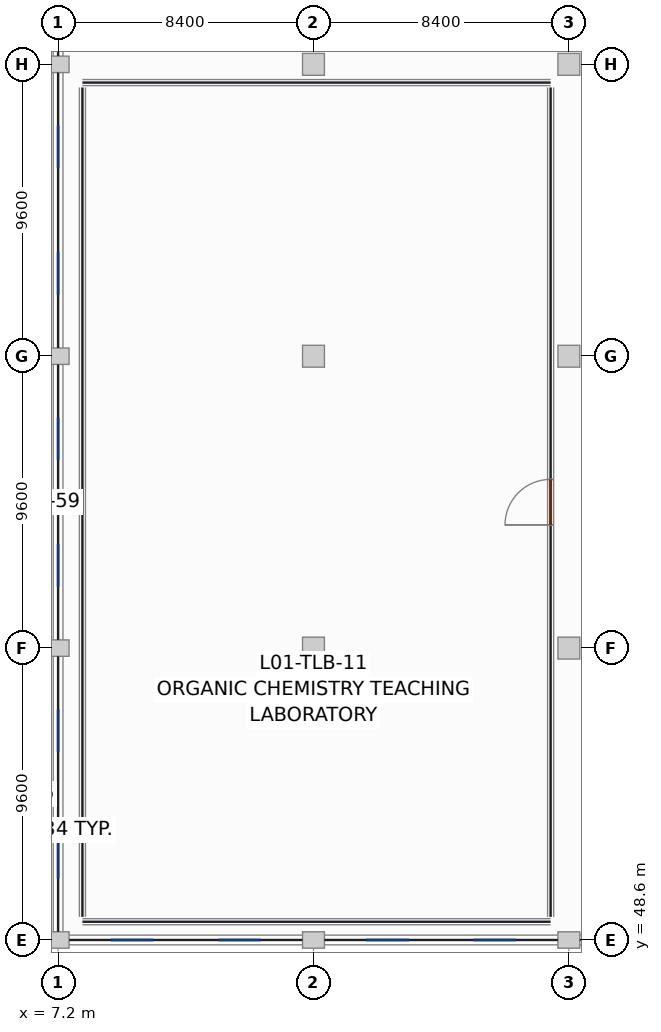
"""IFC4 building model, lengths in metres.
Left out: names, types, materials, properties, quantities, classifications, styles, units other than length and angle.
Written with IfcOpenShell. Run it as: python <this file> out.ifc"""

import sys

from ifc_helpers import new_model, si_unit, direction, frame, frame_2d, origin, origin_2d, place, context, subcontext, project, spatial, rectangle, extrude, element, fill, save


model = new_model("IFC4")
c1 = context("Model", 3, precision=1e-05, world=origin(), true_north=direction((0.0, 1.0)))
c2 = subcontext(c1, "Body", "Model", "MODEL_VIEW")
j1 = project(units=[si_unit("LENGTHUNIT", "METRE"), si_unit("PLANEANGLEUNIT", "RADIAN")], contexts=[c1])
p1 = place(None, origin())
s1 = spatial("IfcSite", under=j1, at=p1, CompositionType="ELEMENT")
p2 = place(p1, origin())
s2 = spatial("IfcBuilding", under=s1, at=p2, CompositionType="ELEMENT")
p3 = place(p2, frame((0.0, 0.0, 5.4)))
s3 = spatial("IfcBuildingStorey", under=s2, at=p3, CompositionType="ELEMENT", Elevation=5.4)
for number, where, z_axis, x_axis in (
    (1, (7.2, 48.6, 0.0), (0.0, 0.0, 1.0), (1.0, 0.0, 0.0)),
    (2, (7.2, 58.2, 0.0), (0.0, 0.0, 1.0), (1.0, 0.0, 0.0)),
    (3, (7.2, 67.8, 0.0), (0.0, 0.0, 1.0), (1.0, 0.0, 0.0)),
    (4, (7.2, 77.4, 0.0), (0.0, 0.0, 1.0), (1.0, 0.0, 0.0)),
):
    element("IfcColumn", number, at=place(p3, frame(where, z_axis=z_axis, x_axis=x_axis)), inside=s3, PredefinedType="COLUMN", context=c2, shape_type="SweptSolid", body=[
        extrude(rectangle(XDim=0.72, YDim=0.54, at=origin_2d()), origin(), (0.0, 0.0, 1.0), 4.28),
    ])
p4 = place(p3, frame((15.6, 48.6, 0.0), z_axis=(0.0, 0.0, 1.0), x_axis=(1.0, 0.0, 0.0)))
e5 = element("IfcColumn", 5, at=p4, inside=s3, PredefinedType="COLUMN", context=c2, shape_type="SweptSolid", body=[
    extrude(rectangle(XDim=0.72, YDim=0.54, at=origin_2d()), origin(), (0.0, 0.0, 1.0), 4.18),
])
for number, where, z_axis, x_axis in (
    (6, (15.6, 58.2, 0.0), (0.0, 0.0, 1.0), (1.0, 0.0, 0.0)),
    (7, (15.6, 67.8, 0.0), (0.0, 0.0, 1.0), (1.0, 0.0, 0.0)),
    (8, (15.6, 77.4, 0.0), (0.0, 0.0, 1.0), (1.0, 0.0, 0.0)),
):
    element("IfcColumn", number, at=place(p3, frame(where, z_axis=z_axis, x_axis=x_axis)), inside=s3, PredefinedType="COLUMN", context=c2, shape_type="SweptSolid", body=[
        extrude(rectangle(XDim=0.72, YDim=0.72, at=origin_2d()), origin(), (0.0, 0.0, 1.0), 4.18),
    ])
p5 = place(p3, frame((24.0, 48.6, 0.0), z_axis=(0.0, 0.0, 1.0), x_axis=(1.0, 0.0, 0.0)))
e9 = element("IfcColumn", 9, at=p5, inside=s3, PredefinedType="COLUMN", context=c2, shape_type="SweptSolid", body=[
    extrude(rectangle(XDim=0.72, YDim=0.54, at=origin_2d()), origin(), (0.0, 0.0, 1.0), 4.18),
])
for number, where, z_axis, x_axis in (
    (10, (24.0, 58.2, 0.0), (0.0, 0.0, 1.0), (1.0, 0.0, 0.0)),
    (11, (24.0, 67.8, 0.0), (0.0, 0.0, 1.0), (1.0, 0.0, 0.0)),
    (12, (24.0, 77.4, 0.0), (0.0, 0.0, 1.0), (1.0, 0.0, 0.0)),
):
    element("IfcColumn", number, at=place(p3, frame(where, z_axis=z_axis, x_axis=x_axis)), inside=s3, PredefinedType="COLUMN", context=c2, shape_type="SweptSolid", body=[
        extrude(rectangle(XDim=0.72, YDim=0.72, at=origin_2d()), origin(), (0.0, 0.0, 1.0), 4.18),
    ])
p6 = place(p3, frame((7.562, 48.6, 0.0), z_axis=(0.0, 0.0, 1.0), x_axis=(1.0, 0.0, 0.0)))
e13 = element("IfcWall", 13, at=p6, inside=s3, PredefinedType="SOLIDWALL", context=c2, shape_type="SweptSolid", body=[
    extrude(rectangle(XDim=7.676, YDim=0.32, at=frame_2d((3.838, 0.0))), origin(), (0.0, 0.0, 1.0), 3.38),
])
p7 = place(p6, frame((1.373, 0.0, 0.85)))
e14 = element("IfcOpeningElement", 14, at=p7, cuts=e13, PredefinedType="OPENING", context=c2, shape_type="SweptSolid", body=[
    extrude(rectangle(XDim=1.4, YDim=1.65, at=frame_2d((0.7, 0.825))), frame((0.0, 0.17, 0.0), z_axis=(0.0, -1.0, 0.0), x_axis=(1.0, 0.0, 0.0)), (0.0, 0.0, 1.0), 0.34),
])
p8 = place(p6, frame((4.904, 0.0, 0.85)))
e15 = element("IfcOpeningElement", 15, at=p8, cuts=e13, PredefinedType="OPENING", context=c2, shape_type="SweptSolid", body=[
    extrude(rectangle(XDim=1.4, YDim=1.65, at=frame_2d((0.7, 0.825))), frame((0.0, 0.17, 0.0), z_axis=(0.0, -1.0, 0.0), x_axis=(1.0, 0.0, 0.0)), (0.0, 0.0, 1.0), 0.34),
])
p9 = place(p3, frame((15.962, 48.6, 0.0), z_axis=(0.0, 0.0, 1.0), x_axis=(1.0, 0.0, 0.0)))
e16 = element("IfcWall", 16, at=p9, inside=s3, PredefinedType="SOLIDWALL", context=c2, shape_type="SweptSolid", body=[
    extrude(rectangle(XDim=7.676, YDim=0.32, at=frame_2d((3.838, 0.0))), origin(), (0.0, 0.0, 1.0), 3.38),
])
p10 = place(p9, frame((1.373, 0.0, 0.85)))
e17 = element("IfcOpeningElement", 17, at=p10, cuts=e16, PredefinedType="OPENING", context=c2, shape_type="SweptSolid", body=[
    extrude(rectangle(XDim=1.4, YDim=1.65, at=frame_2d((0.7, 0.825))), frame((0.0, 0.17, 0.0), z_axis=(0.0, -1.0, 0.0), x_axis=(1.0, 0.0, 0.0)), (0.0, 0.0, 1.0), 0.34),
])
p11 = place(p9, frame((4.904, 0.0, 0.85)))
e18 = element("IfcOpeningElement", 18, at=p11, cuts=e16, PredefinedType="OPENING", context=c2, shape_type="SweptSolid", body=[
    extrude(rectangle(XDim=1.4, YDim=1.65, at=frame_2d((0.7, 0.825))), frame((0.0, 0.17, 0.0), z_axis=(0.0, -1.0, 0.0), x_axis=(1.0, 0.0, 0.0)), (0.0, 0.0, 1.0), 0.34),
])
p12 = place(p3, frame((24.362, 48.6, 0.0), z_axis=(0.0, 0.0, 1.0), x_axis=(1.0, 0.0, 0.0)))
e19 = element("IfcWall", 19, at=p12, inside=s3, PredefinedType="SOLIDWALL", context=c2, shape_type="SweptSolid", body=[
    extrude(rectangle(XDim=7.676, YDim=0.32, at=frame_2d((3.838, 0.0))), origin(), (0.0, 0.0, 1.0), 3.38),
])
p13 = place(p12, frame((4.904, 0.0, 0.85)))
e20 = element("IfcOpeningElement", 20, at=p13, cuts=e19, PredefinedType="OPENING", context=c2, shape_type="SweptSolid", body=[
    extrude(rectangle(XDim=1.4, YDim=1.65, at=frame_2d((0.7, 0.825))), frame((0.0, 0.17, 0.0), z_axis=(0.0, -1.0, 0.0), x_axis=(1.0, 0.0, 0.0)), (0.0, 0.0, 1.0), 0.34),
])
p14 = place(p3, frame((7.2, 48.872, 0.0), z_axis=(0.0, 0.0, 1.0), x_axis=(0.0, 1.0, 0.0)))
e21 = element("IfcWall", 21, at=p14, inside=s3, PredefinedType="SOLIDWALL", context=c2, shape_type="SweptSolid", body=[
    extrude(rectangle(XDim=9.056, YDim=0.32, at=frame_2d((4.528, 0.0))), origin(), (0.0, 0.0, 1.0), 3.38),
])
p15 = place(p14, frame((1.745, 0.0, 0.85)))
e22 = element("IfcOpeningElement", 22, at=p15, cuts=e21, PredefinedType="OPENING", context=c2, shape_type="SweptSolid", body=[
    extrude(rectangle(XDim=1.4, YDim=1.65, at=frame_2d((0.7, 0.825))), frame((0.0, 0.17, 0.0), z_axis=(0.0, -1.0, 0.0), x_axis=(1.0, 0.0, 0.0)), (0.0, 0.0, 1.0), 0.34),
])
p16 = place(p14, frame((5.911, 0.0, 0.85)))
e23 = element("IfcOpeningElement", 23, at=p16, cuts=e21, PredefinedType="OPENING", context=c2, shape_type="SweptSolid", body=[
    extrude(rectangle(XDim=1.4, YDim=1.65, at=frame_2d((0.7, 0.825))), frame((0.0, 0.17, 0.0), z_axis=(0.0, -1.0, 0.0), x_axis=(1.0, 0.0, 0.0)), (0.0, 0.0, 1.0), 0.34),
])
p17 = place(p3, frame((7.2, 58.472, 0.0), z_axis=(0.0, 0.0, 1.0), x_axis=(0.0, 1.0, 0.0)))
e24 = element("IfcWall", 24, at=p17, inside=s3, PredefinedType="SOLIDWALL", context=c2, shape_type="SweptSolid", body=[
    extrude(rectangle(XDim=9.056, YDim=0.32, at=frame_2d((4.528, 0.0))), origin(), (0.0, 0.0, 1.0), 3.38),
])
p18 = place(p17, frame((1.745, 0.0, 0.85)))
e25 = element("IfcOpeningElement", 25, at=p18, cuts=e24, PredefinedType="OPENING", context=c2, shape_type="SweptSolid", body=[
    extrude(rectangle(XDim=1.4, YDim=1.65, at=frame_2d((0.7, 0.825))), frame((0.0, 0.17, 0.0), z_axis=(0.0, -1.0, 0.0), x_axis=(1.0, 0.0, 0.0)), (0.0, 0.0, 1.0), 0.34),
])
p19 = place(p17, frame((5.911, 0.0, 0.85)))
e26 = element("IfcOpeningElement", 26, at=p19, cuts=e24, PredefinedType="OPENING", context=c2, shape_type="SweptSolid", body=[
    extrude(rectangle(XDim=1.4, YDim=1.65, at=frame_2d((0.7, 0.825))), frame((0.0, 0.17, 0.0), z_axis=(0.0, -1.0, 0.0), x_axis=(1.0, 0.0, 0.0)), (0.0, 0.0, 1.0), 0.34),
])
p20 = place(p3, frame((7.2, 68.072, 0.0), z_axis=(0.0, 0.0, 1.0), x_axis=(0.0, 1.0, 0.0)))
e27 = element("IfcWall", 27, at=p20, inside=s3, PredefinedType="SOLIDWALL", context=c2, shape_type="SweptSolid", body=[
    extrude(rectangle(XDim=9.056, YDim=0.32, at=frame_2d((4.528, 0.0))), origin(), (0.0, 0.0, 1.0), 3.38),
])
p21 = place(p20, frame((1.745, 0.0, 0.85)))
e28 = element("IfcOpeningElement", 28, at=p21, cuts=e27, PredefinedType="OPENING", context=c2, shape_type="SweptSolid", body=[
    extrude(rectangle(XDim=1.4, YDim=1.65, at=frame_2d((0.7, 0.825))), frame((0.0, 0.17, 0.0), z_axis=(0.0, -1.0, 0.0), x_axis=(1.0, 0.0, 0.0)), (0.0, 0.0, 1.0), 0.34),
])
p22 = place(p20, frame((5.911, 0.0, 0.85)))
e29 = element("IfcOpeningElement", 29, at=p22, cuts=e27, PredefinedType="OPENING", context=c2, shape_type="SweptSolid", body=[
    extrude(rectangle(XDim=1.4, YDim=1.65, at=frame_2d((0.7, 0.825))), frame((0.0, 0.17, 0.0), z_axis=(0.0, -1.0, 0.0), x_axis=(1.0, 0.0, 0.0)), (0.0, 0.0, 1.0), 0.34),
])
p23 = place(p3, frame((7.2, 77.672, 0.0), z_axis=(0.0, 0.0, 1.0), x_axis=(0.0, 1.0, 0.0)))
e30 = element("IfcWall", 30, at=p23, inside=s3, PredefinedType="SOLIDWALL", context=c2, shape_type="SweptSolid", body=[
    extrude(rectangle(XDim=8.976, YDim=0.32, at=frame_2d((4.488, 0.0))), origin(), (0.0, 0.0, 1.0), 3.38),
])
p24 = place(p23, frame((1.723, 0.0, 0.85)))
e31 = element("IfcOpeningElement", 31, at=p24, cuts=e30, PredefinedType="OPENING", context=c2, shape_type="SweptSolid", body=[
    extrude(rectangle(XDim=1.4, YDim=1.65, at=frame_2d((0.7, 0.825))), frame((0.0, 0.17, 0.0), z_axis=(0.0, -1.0, 0.0), x_axis=(1.0, 0.0, 0.0)), (0.0, 0.0, 1.0), 0.34),
])
p25 = place(p23, frame((5.853, 0.0, 0.85)))
e32 = element("IfcOpeningElement", 32, at=p25, cuts=e30, PredefinedType="OPENING", context=c2, shape_type="SweptSolid", body=[
    extrude(rectangle(XDim=1.4, YDim=1.65, at=frame_2d((0.7, 0.825))), frame((0.0, 0.17, 0.0), z_axis=(0.0, -1.0, 0.0), x_axis=(1.0, 0.0, 0.0)), (0.0, 0.0, 1.0), 0.34),
])
for number, where, z_axis, x_axis in (
    (33, (8.0, 49.2, 0.0), (0.0, 0.0, 1.0), (1.0, 0.0, 0.0)),
    (34, (8.0, 76.8, 0.0), (0.0, 0.0, 1.0), (1.0, 0.0, 0.0)),
):
    element("IfcWall", number, at=place(p3, frame(where, z_axis=z_axis, x_axis=x_axis)), inside=s3, PredefinedType="PARTITIONING", context=c2, shape_type="SweptSolid", body=[
        extrude(rectangle(XDim=15.4, YDim=0.2, at=frame_2d((7.7, 0.0))), origin(), (0.0, 0.0, 1.0), 3.22),
    ])
p26 = place(p3, frame((8.0, 49.36, 0.0), z_axis=(0.0, 0.0, 1.0), x_axis=(0.0, 1.0, 0.0)))
e35 = element("IfcWall", 35, at=p26, inside=s3, PredefinedType="PARTITIONING", context=c2, shape_type="SweptSolid", body=[
    extrude(rectangle(XDim=27.28, YDim=0.2, at=frame_2d((13.64, 0.0))), origin(), (0.0, 0.0, 1.0), 3.22),
])
p27 = place(p3, frame((23.4, 49.36, 0.0), z_axis=(0.0, 0.0, 1.0), x_axis=(0.0, 1.0, 0.0)))
e36 = element("IfcWall", 36, at=p27, inside=s3, PredefinedType="PARTITIONING", context=c2, shape_type="SweptSolid", body=[
    extrude(rectangle(XDim=27.28, YDim=0.2, at=frame_2d((13.64, 0.0))), origin(), (0.0, 0.0, 1.0), 3.22),
])
p28 = place(p27, frame((12.89, 0.0, 0.0)))
e37 = element("IfcOpeningElement", 37, at=p28, cuts=e36, PredefinedType="OPENING", context=c2, shape_type="SweptSolid", body=[
    extrude(rectangle(XDim=1.5, YDim=2.2, at=frame_2d((0.75, 1.1))), frame((0.0, 0.11, 0.0), z_axis=(0.0, -1.0, 0.0), x_axis=(1.0, 0.0, 0.0)), (0.0, 0.0, 1.0), 0.22),
])
p29 = place(p7, origin())
e38 = element("IfcWindow", 38, at=p29, inside=s3, PartitioningType="SINGLE_PANEL", PredefinedType="WINDOW", context=c2, shape_type="SweptSolid", body=[
    extrude(rectangle(XDim=1.4, YDim=1.65, at=frame_2d((0.7, 0.825))), frame((0.0, 0.03, 0.0), z_axis=(0.0, -1.0, 0.0), x_axis=(1.0, 0.0, 0.0)), (0.0, 0.0, 1.0), 0.06),
])
fill(e14, e38)
p30 = place(p8, origin())
e39 = element("IfcWindow", 39, at=p30, inside=s3, PartitioningType="SINGLE_PANEL", PredefinedType="WINDOW", context=c2, shape_type="SweptSolid", body=[
    extrude(rectangle(XDim=1.4, YDim=1.65, at=frame_2d((0.7, 0.825))), frame((0.0, 0.03, 0.0), z_axis=(0.0, -1.0, 0.0), x_axis=(1.0, 0.0, 0.0)), (0.0, 0.0, 1.0), 0.06),
])
fill(e15, e39)
p31 = place(p10, origin())
e40 = element("IfcWindow", 40, at=p31, inside=s3, PartitioningType="SINGLE_PANEL", PredefinedType="WINDOW", context=c2, shape_type="SweptSolid", body=[
    extrude(rectangle(XDim=1.4, YDim=1.65, at=frame_2d((0.7, 0.825))), frame((0.0, 0.03, 0.0), z_axis=(0.0, -1.0, 0.0), x_axis=(1.0, 0.0, 0.0)), (0.0, 0.0, 1.0), 0.06),
])
fill(e17, e40)
p32 = place(p11, origin())
e41 = element("IfcWindow", 41, at=p32, inside=s3, PartitioningType="SINGLE_PANEL", PredefinedType="WINDOW", context=c2, shape_type="SweptSolid", body=[
    extrude(rectangle(XDim=1.4, YDim=1.65, at=frame_2d((0.7, 0.825))), frame((0.0, 0.03, 0.0), z_axis=(0.0, -1.0, 0.0), x_axis=(1.0, 0.0, 0.0)), (0.0, 0.0, 1.0), 0.06),
])
fill(e18, e41)
p33 = place(p15, origin())
e42 = element("IfcWindow", 42, at=p33, inside=s3, PartitioningType="SINGLE_PANEL", PredefinedType="WINDOW", context=c2, shape_type="SweptSolid", body=[
    extrude(rectangle(XDim=1.4, YDim=1.65, at=frame_2d((0.7, 0.825))), frame((0.0, 0.03, 0.0), z_axis=(0.0, -1.0, 0.0), x_axis=(1.0, 0.0, 0.0)), (0.0, 0.0, 1.0), 0.06),
])
fill(e22, e42)
p34 = place(p16, origin())
e43 = element("IfcWindow", 43, at=p34, inside=s3, PartitioningType="SINGLE_PANEL", PredefinedType="WINDOW", context=c2, shape_type="SweptSolid", body=[
    extrude(rectangle(XDim=1.4, YDim=1.65, at=frame_2d((0.7, 0.825))), frame((0.0, 0.03, 0.0), z_axis=(0.0, -1.0, 0.0), x_axis=(1.0, 0.0, 0.0)), (0.0, 0.0, 1.0), 0.06),
])
fill(e23, e43)
p35 = place(p18, origin())
e44 = element("IfcWindow", 44, at=p35, inside=s3, PartitioningType="SINGLE_PANEL", PredefinedType="WINDOW", context=c2, shape_type="SweptSolid", body=[
    extrude(rectangle(XDim=1.4, YDim=1.65, at=frame_2d((0.7, 0.825))), frame((0.0, 0.03, 0.0), z_axis=(0.0, -1.0, 0.0), x_axis=(1.0, 0.0, 0.0)), (0.0, 0.0, 1.0), 0.06),
])
fill(e25, e44)
p36 = place(p19, origin())
e45 = element("IfcWindow", 45, at=p36, inside=s3, PartitioningType="SINGLE_PANEL", PredefinedType="WINDOW", context=c2, shape_type="SweptSolid", body=[
    extrude(rectangle(XDim=1.4, YDim=1.65, at=frame_2d((0.7, 0.825))), frame((0.0, 0.03, 0.0), z_axis=(0.0, -1.0, 0.0), x_axis=(1.0, 0.0, 0.0)), (0.0, 0.0, 1.0), 0.06),
])
fill(e26, e45)
p37 = place(p21, origin())
e46 = element("IfcWindow", 46, at=p37, inside=s3, PartitioningType="SINGLE_PANEL", PredefinedType="WINDOW", context=c2, shape_type="SweptSolid", body=[
    extrude(rectangle(XDim=1.4, YDim=1.65, at=frame_2d((0.7, 0.825))), frame((0.0, 0.03, 0.0), z_axis=(0.0, -1.0, 0.0), x_axis=(1.0, 0.0, 0.0)), (0.0, 0.0, 1.0), 0.06),
])
fill(e28, e46)
p38 = place(p22, origin())
e47 = element("IfcWindow", 47, at=p38, inside=s3, PartitioningType="SINGLE_PANEL", PredefinedType="WINDOW", context=c2, shape_type="SweptSolid", body=[
    extrude(rectangle(XDim=1.4, YDim=1.65, at=frame_2d((0.7, 0.825))), frame((0.0, 0.03, 0.0), z_axis=(0.0, -1.0, 0.0), x_axis=(1.0, 0.0, 0.0)), (0.0, 0.0, 1.0), 0.06),
])
fill(e29, e47)
p39 = place(p28, origin())
e48 = element("IfcDoor", 48, at=p39, inside=s3, OperationType="SINGLE_SWING_LEFT", PredefinedType="DOOR", context=c2, shape_type="SweptSolid", body=[
    extrude(rectangle(XDim=1.5, YDim=2.2, at=frame_2d((0.75, 1.1))), frame((0.0, 0.025, 0.0), z_axis=(0.0, -1.0, 0.0), x_axis=(1.0, 0.0, 0.0)), (0.0, 0.0, 1.0), 0.05),
])
fill(e37, e48)
save(model, sys.argv[1])
